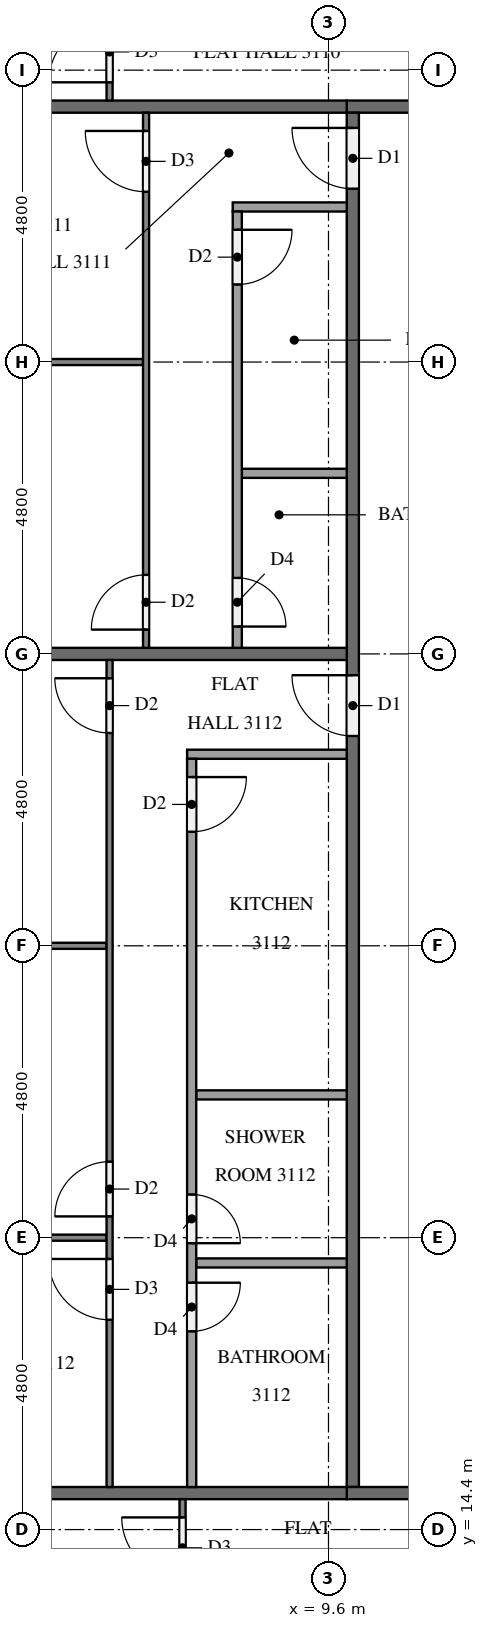
"""IFC4 building model, lengths in metres.
Left out: names, types, materials, properties, quantities, classifications, styles, units other than length and angle.
Written with IfcOpenShell. Run it as: python <this file> out.ifc"""

import sys

from ifc_helpers import new_model, si_unit, direction, frame, frame_2d, origin, place, context, subcontext, project, spatial, rectangle, extrude, element, fill, save


model = new_model("IFC4")
c1 = context("Model", 3, precision=1e-05, world=origin(), true_north=direction((0.0, 1.0)))
c2 = subcontext(c1, "Body", "Model", "MODEL_VIEW")
j1 = project(units=[si_unit("LENGTHUNIT", "METRE"), si_unit("PLANEANGLEUNIT", "RADIAN")], contexts=[c1])
p1 = place(None, origin())
s1 = spatial("IfcSite", under=j1, at=p1, CompositionType="ELEMENT")
p2 = place(p1, origin())
s2 = spatial("IfcBuilding", under=s1, at=p2, CompositionType="ELEMENT")
p3 = place(p2, frame((0.0, 0.0, 122.6)))
s3 = spatial("IfcBuildingStorey", under=s2, at=p3, CompositionType="ELEMENT", Elevation=122.6)
p4 = place(p3, frame((12.1, 37.8, 0.0), z_axis=(0.0, 0.0, 1.0), x_axis=(-1.0, 0.0, 0.0)))
e1 = element("IfcWall", 1, at=p4, inside=s3, PredefinedType="PARTITIONING", context=c2, shape_type="SweptSolid", body=[
    extrude(rectangle(XDim=2.2, YDim=0.2, at=frame_2d((1.1, 0.0))), origin(), (0.0, 0.0, 1.0), 3.2),
])
p5 = place(p3, frame((10.0, 15.1, 0.0), z_axis=(0.0, 0.0, 1.0), x_axis=(0.0, 1.0, 0.0)))
e2 = element("IfcWall", 2, at=p5, inside=s3, PredefinedType="PARTITIONING", context=c2, shape_type="SweptSolid", body=[
    extrude(rectangle(XDim=22.6, YDim=0.2, at=frame_2d((11.3, 0.0))), origin(), (0.0, 0.0, 1.0), 3.2),
])
p6 = place(p5, frame((21.35, 0.0, 0.0)))
e3 = element("IfcOpeningElement", 3, at=p6, cuts=e2, PredefinedType="OPENING", context=c2, shape_type="SweptSolid", body=[
    extrude(rectangle(XDim=1.0, YDim=2.1, at=frame_2d((0.5, 1.05))), frame((0.0, 0.11, 0.0), z_axis=(0.0, -1.0, 0.0), x_axis=(1.0, 0.0, 0.0)), (0.0, 0.0, 1.0), 0.22),
])
p7 = place(p5, frame((12.35, 0.0, 0.0)))
e4 = element("IfcOpeningElement", 4, at=p7, cuts=e2, PredefinedType="OPENING", context=c2, shape_type="SweptSolid", body=[
    extrude(rectangle(XDim=1.0, YDim=2.1, at=frame_2d((0.5, 1.05))), frame((0.0, 0.11, 0.0), z_axis=(0.0, -1.0, 0.0), x_axis=(1.0, 0.0, 0.0)), (0.0, 0.0, 1.0), 0.22),
])
p8 = place(p3, frame((9.9, 15.0, 0.0), z_axis=(0.0, 0.0, 1.0), x_axis=(1.0, 0.0, 0.0)))
e5 = element("IfcWall", 5, at=p8, inside=s3, PredefinedType="PARTITIONING", context=c2, shape_type="SweptSolid", body=[
    extrude(rectangle(XDim=2.2, YDim=0.2, at=frame_2d((1.1, 0.0))), origin(), (0.0, 0.0, 1.0), 3.2),
])
for number, where, z_axis, x_axis in (
    (6, (0.375, 37.8, 0.0), (0.0, 0.0, 1.0), (1.0, 0.0, 0.0)),
    (7, (0.375, 28.8, 0.0), (0.0, 0.0, 1.0), (1.0, 0.0, 0.0)),
):
    element("IfcWall", number, at=place(p3, frame(where, z_axis=z_axis, x_axis=x_axis)), inside=s3, PredefinedType="PARTITIONING", context=c2, shape_type="SweptSolid", body=[
        extrude(rectangle(XDim=9.525, YDim=0.2, at=frame_2d((4.762, 0.0))), origin(), (0.0, 0.0, 1.0), 3.2),
    ])
p9 = place(p3, frame((0.1, 15.0, 0.0), z_axis=(0.0, 0.0, 1.0), x_axis=(1.0, 0.0, 0.0)))
e8 = element("IfcWall", 8, at=p9, inside=s3, PredefinedType="PARTITIONING", context=c2, shape_type="SweptSolid", body=[
    extrude(rectangle(XDim=9.8, YDim=0.2, at=frame_2d((4.9, 0.0))), origin(), (0.0, 0.0, 1.0), 3.2),
])
p10 = place(p3, frame((6.0, 37.9, 0.0), z_axis=(0.0, 0.0, 1.0), x_axis=(0.0, 1.0, 0.0)))
e9 = element("IfcWall", 9, at=p10, inside=s3, PredefinedType="PARTITIONING", context=c2, shape_type="SweptSolid", body=[
    extrude(rectangle(XDim=14.8, YDim=0.1, at=frame_2d((7.4, 0.0))), origin(), (0.0, 0.0, 1.0), 3.2),
])
p11 = place(p10, frame((0.3, 0.0, 0.0)))
e10 = element("IfcOpeningElement", 10, at=p11, cuts=e9, PredefinedType="OPENING", context=c2, shape_type="SweptSolid", body=[
    extrude(rectangle(XDim=1.0, YDim=2.1, at=frame_2d((0.5, 1.05))), frame((0.0, 0.06, 0.0), z_axis=(0.0, -1.0, 0.0), x_axis=(1.0, 0.0, 0.0)), (0.0, 0.0, 1.0), 0.12),
])
p12 = place(p10, frame((8.85, 0.0, 0.0)))
e11 = element("IfcOpeningElement", 11, at=p12, cuts=e9, PredefinedType="OPENING", context=c2, shape_type="SweptSolid", body=[
    extrude(rectangle(XDim=0.9, YDim=2.1, at=frame_2d((0.45, 1.05))), frame((0.0, 0.06, 0.0), z_axis=(0.0, -1.0, 0.0), x_axis=(1.0, 0.0, 0.0)), (0.0, 0.0, 1.0), 0.12),
])
p13 = place(p10, frame((10.45, 0.0, 0.0)))
e12 = element("IfcOpeningElement", 12, at=p13, cuts=e9, PredefinedType="OPENING", context=c2, shape_type="SweptSolid", body=[
    extrude(rectangle(XDim=0.9, YDim=2.1, at=frame_2d((0.45, 1.05))), frame((0.0, 0.06, 0.0), z_axis=(0.0, -1.0, 0.0), x_axis=(1.0, 0.0, 0.0)), (0.0, 0.0, 1.0), 0.12),
])
p14 = place(p3, frame((6.55, 33.6, 0.0), z_axis=(0.0, 0.0, 1.0), x_axis=(-1.0, 0.0, 0.0)))
e13 = element("IfcWall", 13, at=p14, inside=s3, PredefinedType="PARTITIONING", context=c2, shape_type="SweptSolid", body=[
    extrude(rectangle(XDim=6.45, YDim=0.1, at=frame_2d((3.225, 0.0))), origin(), (0.0, 0.0, 1.0), 3.2),
])
p15 = place(p3, frame((6.6, 28.9, 0.0), z_axis=(0.0, 0.0, 1.0), x_axis=(0.0, 1.0, 0.0)))
e14 = element("IfcWall", 14, at=p15, inside=s3, PredefinedType="PARTITIONING", context=c2, shape_type="SweptSolid", body=[
    extrude(rectangle(XDim=8.8, YDim=0.1, at=frame_2d((4.4, 0.0))), origin(), (0.0, 0.0, 1.0), 3.2),
])
p16 = place(p15, frame((7.5, 0.0, 0.0)))
e15 = element("IfcOpeningElement", 15, at=p16, cuts=e14, PredefinedType="OPENING", context=c2, shape_type="SweptSolid", body=[
    extrude(rectangle(XDim=1.0, YDim=2.1, at=frame_2d((0.5, 1.05))), frame((0.0, 0.06, 0.0), z_axis=(0.0, -1.0, 0.0), x_axis=(1.0, 0.0, 0.0)), (0.0, 0.0, 1.0), 0.12),
])
p17 = place(p15, frame((0.3, 0.0, 0.0)))
e16 = element("IfcOpeningElement", 16, at=p17, cuts=e14, PredefinedType="OPENING", context=c2, shape_type="SweptSolid", body=[
    extrude(rectangle(XDim=0.9, YDim=2.1, at=frame_2d((0.45, 1.05))), frame((0.0, 0.06, 0.0), z_axis=(0.0, -1.0, 0.0), x_axis=(1.0, 0.0, 0.0)), (0.0, 0.0, 1.0), 0.12),
])
p18 = place(p3, frame((9.9, 31.77, 0.0), z_axis=(0.0, 0.0, 1.0), x_axis=(-1.0, 0.0, 0.0)))
e17 = element("IfcWall", 17, at=p18, inside=s3, PredefinedType="PARTITIONING", context=c2, shape_type="SweptSolid", body=[
    extrude(rectangle(XDim=1.725, YDim=0.15, at=frame_2d((0.862, 0.0))), origin(), (0.0, 0.0, 1.0), 3.2),
])
p19 = place(p3, frame((9.9, 36.15, 0.0), z_axis=(0.0, 0.0, 1.0), x_axis=(-1.0, 0.0, 0.0)))
e18 = element("IfcWall", 18, at=p19, inside=s3, PredefinedType="PARTITIONING", context=c2, shape_type="SweptSolid", body=[
    extrude(rectangle(XDim=1.875, YDim=0.15, at=frame_2d((0.938, 0.0))), origin(), (0.0, 0.0, 1.0), 3.2),
])
p20 = place(p3, frame((8.1, 36.075, 0.0), z_axis=(0.0, 0.0, 1.0), x_axis=(0.0, -1.0, 0.0)))
e19 = element("IfcWall", 19, at=p20, inside=s3, PredefinedType="PARTITIONING", context=c2, shape_type="SweptSolid", body=[
    extrude(rectangle(XDim=7.175, YDim=0.15, at=frame_2d((3.587, 0.0))), origin(), (0.0, 0.0, 1.0), 3.2),
])
p21 = place(p20, frame((0.3, 0.0, 0.0)))
e20 = element("IfcOpeningElement", 20, at=p21, cuts=e19, PredefinedType="OPENING", context=c2, shape_type="SweptSolid", body=[
    extrude(rectangle(XDim=0.9, YDim=2.1, at=frame_2d((0.45, 1.05))), frame((0.0, 0.085, 0.0), z_axis=(0.0, -1.0, 0.0), x_axis=(1.0, 0.0, 0.0)), (0.0, 0.0, 1.0), 0.17),
])
p22 = place(p20, frame((6.025, 0.0, 0.0)))
e21 = element("IfcOpeningElement", 21, at=p22, cuts=e19, PredefinedType="OPENING", context=c2, shape_type="SweptSolid", body=[
    extrude(rectangle(XDim=0.8, YDim=2.1, at=frame_2d((0.4, 1.05))), frame((0.0, 0.085, 0.0), z_axis=(0.0, -1.0, 0.0), x_axis=(1.0, 0.0, 0.0)), (0.0, 0.0, 1.0), 0.17),
])
p23 = place(p3, frame((5.95, 24.0, 0.0), z_axis=(0.0, 0.0, 1.0), x_axis=(-1.0, 0.0, 0.0)))
e22 = element("IfcWall", 22, at=p23, inside=s3, PredefinedType="PARTITIONING", context=c2, shape_type="SweptSolid", body=[
    extrude(rectangle(XDim=5.85, YDim=0.1, at=frame_2d((2.925, 0.0))), origin(), (0.0, 0.0, 1.0), 3.2),
])
p24 = place(p3, frame((5.95, 19.2, 0.0), z_axis=(0.0, 0.0, 1.0), x_axis=(-1.0, 0.0, 0.0)))
e23 = element("IfcWall", 23, at=p24, inside=s3, PredefinedType="PARTITIONING", context=c2, shape_type="SweptSolid", body=[
    extrude(rectangle(XDim=5.575, YDim=0.1, at=frame_2d((2.788, 0.0))), origin(), (0.0, 0.0, 1.0), 3.2),
])
p25 = place(p3, frame((6.0, 15.1, 0.0), z_axis=(0.0, 0.0, 1.0), x_axis=(0.0, 1.0, 0.0)))
e24 = element("IfcWall", 24, at=p25, inside=s3, PredefinedType="PARTITIONING", context=c2, shape_type="SweptSolid", body=[
    extrude(rectangle(XDim=13.6, YDim=0.1, at=frame_2d((6.8, 0.0))), origin(), (0.0, 0.0, 1.0), 3.2),
])
p26 = place(p25, frame((12.4, 0.0, 0.0)))
e25 = element("IfcOpeningElement", 25, at=p26, cuts=e24, PredefinedType="OPENING", context=c2, shape_type="SweptSolid", body=[
    extrude(rectangle(XDim=0.9, YDim=2.1, at=frame_2d((0.45, 1.05))), frame((0.0, 0.06, 0.0), z_axis=(0.0, -1.0, 0.0), x_axis=(1.0, 0.0, 0.0)), (0.0, 0.0, 1.0), 0.12),
])
p27 = place(p25, frame((4.45, 0.0, 0.0)))
e26 = element("IfcOpeningElement", 26, at=p27, cuts=e24, PredefinedType="OPENING", context=c2, shape_type="SweptSolid", body=[
    extrude(rectangle(XDim=0.9, YDim=2.1, at=frame_2d((0.45, 1.05))), frame((0.0, 0.06, 0.0), z_axis=(0.0, -1.0, 0.0), x_axis=(1.0, 0.0, 0.0)), (0.0, 0.0, 1.0), 0.12),
])
p28 = place(p25, frame((2.75, 0.0, 0.0)))
e27 = element("IfcOpeningElement", 27, at=p28, cuts=e24, PredefinedType="OPENING", context=c2, shape_type="SweptSolid", body=[
    extrude(rectangle(XDim=1.0, YDim=2.1, at=frame_2d((0.5, 1.05))), frame((0.0, 0.06, 0.0), z_axis=(0.0, -1.0, 0.0), x_axis=(1.0, 0.0, 0.0)), (0.0, 0.0, 1.0), 0.12),
])
for number, where, z_axis, x_axis in (
    (28, (9.9, 21.548, 0.0), (0.0, 0.0, 1.0), (-1.0, 0.0, 0.0)),
    (29, (9.9, 18.785, 0.0), (0.0, 0.0, 1.0), (-1.0, 0.0, 0.0)),
):
    element("IfcWall", number, at=place(p3, frame(where, z_axis=z_axis, x_axis=x_axis)), inside=s3, PredefinedType="PARTITIONING", context=c2, shape_type="SweptSolid", body=[
        extrude(rectangle(XDim=2.475, YDim=0.15, at=frame_2d((1.237, 0.0))), origin(), (0.0, 0.0, 1.0), 3.2),
    ])
p29 = place(p3, frame((9.9, 27.15, 0.0), z_axis=(0.0, 0.0, 1.0), x_axis=(-1.0, 0.0, 0.0)))
e30 = element("IfcWall", 30, at=p29, inside=s3, PredefinedType="PARTITIONING", context=c2, shape_type="SweptSolid", body=[
    extrude(rectangle(XDim=2.625, YDim=0.15, at=frame_2d((1.312, 0.0))), origin(), (0.0, 0.0, 1.0), 3.2),
])
p30 = place(p3, frame((7.35, 27.075, 0.0), z_axis=(0.0, 0.0, 1.0), x_axis=(0.0, -1.0, 0.0)))
e31 = element("IfcWall", 31, at=p30, inside=s3, PredefinedType="PARTITIONING", context=c2, shape_type="SweptSolid", body=[
    extrude(rectangle(XDim=11.975, YDim=0.15, at=frame_2d((5.987, 0.0))), origin(), (0.0, 0.0, 1.0), 3.2),
])
p31 = place(p30, frame((0.3, 0.0, 0.0)))
e32 = element("IfcOpeningElement", 32, at=p31, cuts=e31, PredefinedType="OPENING", context=c2, shape_type="SweptSolid", body=[
    extrude(rectangle(XDim=0.9, YDim=2.1, at=frame_2d((0.45, 1.05))), frame((0.0, 0.085, 0.0), z_axis=(0.0, -1.0, 0.0), x_axis=(1.0, 0.0, 0.0)), (0.0, 0.0, 1.0), 0.17),
])
p32 = place(p30, frame((7.165, 0.0, 0.0)))
e33 = element("IfcOpeningElement", 33, at=p32, cuts=e31, PredefinedType="OPENING", context=c2, shape_type="SweptSolid", body=[
    extrude(rectangle(XDim=0.8, YDim=2.1, at=frame_2d((0.4, 1.05))), frame((0.0, 0.085, 0.0), z_axis=(0.0, -1.0, 0.0), x_axis=(1.0, 0.0, 0.0)), (0.0, 0.0, 1.0), 0.17),
])
p33 = place(p30, frame((8.615, 0.0, 0.0)))
e34 = element("IfcOpeningElement", 34, at=p33, cuts=e31, PredefinedType="OPENING", context=c2, shape_type="SweptSolid", body=[
    extrude(rectangle(XDim=0.8, YDim=2.1, at=frame_2d((0.4, 1.05))), frame((0.0, 0.085, 0.0), z_axis=(0.0, -1.0, 0.0), x_axis=(1.0, 0.0, 0.0)), (0.0, 0.0, 1.0), 0.17),
])
p34 = place(p3, frame((7.2, 4.9, 0.0), z_axis=(0.0, 0.0, 1.0), x_axis=(0.0, 1.0, 0.0)))
e35 = element("IfcWall", 35, at=p34, inside=s3, PredefinedType="PARTITIONING", context=c2, shape_type="SweptSolid", body=[
    extrude(rectangle(XDim=10.0, YDim=0.1, at=frame_2d((5.0, 0.0))), origin(), (0.0, 0.0, 1.0), 3.2),
])
p35 = place(p34, frame((8.7, 0.0, 0.0)))
e36 = element("IfcOpeningElement", 36, at=p35, cuts=e35, PredefinedType="OPENING", context=c2, shape_type="SweptSolid", body=[
    extrude(rectangle(XDim=1.0, YDim=2.1, at=frame_2d((0.5, 1.05))), frame((0.0, 0.06, 0.0), z_axis=(0.0, -1.0, 0.0), x_axis=(1.0, 0.0, 0.0)), (0.0, 0.0, 1.0), 0.12),
])
p36 = place(p34, frame((0.3, 0.0, 0.0)))
e37 = element("IfcOpeningElement", 37, at=p36, cuts=e35, PredefinedType="OPENING", context=c2, shape_type="SweptSolid", body=[
    extrude(rectangle(XDim=0.9, YDim=2.1, at=frame_2d((0.45, 1.05))), frame((0.0, 0.06, 0.0), z_axis=(0.0, -1.0, 0.0), x_axis=(1.0, 0.0, 0.0)), (0.0, 0.0, 1.0), 0.12),
])
p37 = place(p6, origin())
e38 = element("IfcDoor", 38, at=p37, inside=s3, OperationType="SINGLE_SWING_RIGHT", PredefinedType="DOOR", context=c2, shape_type="SweptSolid", body=[
    extrude(rectangle(XDim=1.0, YDim=2.1, at=frame_2d((0.5, 1.05))), frame((0.0, 0.025, 0.0), z_axis=(0.0, -1.0, 0.0), x_axis=(1.0, 0.0, 0.0)), (0.0, 0.0, 1.0), 0.05),
])
fill(e3, e38)
p38 = place(p7, origin())
e39 = element("IfcDoor", 39, at=p38, inside=s3, OperationType="SINGLE_SWING_RIGHT", PredefinedType="DOOR", context=c2, shape_type="SweptSolid", body=[
    extrude(rectangle(XDim=1.0, YDim=2.1, at=frame_2d((0.5, 1.05))), frame((0.0, 0.025, 0.0), z_axis=(0.0, -1.0, 0.0), x_axis=(1.0, 0.0, 0.0)), (0.0, 0.0, 1.0), 0.05),
])
fill(e4, e39)
p39 = place(p11, origin())
e40 = element("IfcDoor", 40, at=p39, inside=s3, OperationType="SINGLE_SWING_LEFT", PredefinedType="DOOR", context=c2, shape_type="SweptSolid", body=[
    extrude(rectangle(XDim=1.0, YDim=2.1, at=frame_2d((0.5, 1.05))), frame((0.0, 0.025, 0.0), z_axis=(0.0, -1.0, 0.0), x_axis=(1.0, 0.0, 0.0)), (0.0, 0.0, 1.0), 0.05),
])
fill(e10, e40)
p40 = place(p16, origin())
e41 = element("IfcDoor", 41, at=p40, inside=s3, OperationType="SINGLE_SWING_RIGHT", PredefinedType="DOOR", context=c2, shape_type="SweptSolid", body=[
    extrude(rectangle(XDim=1.0, YDim=2.1, at=frame_2d((0.5, 1.05))), frame((0.0, 0.025, 0.0), z_axis=(0.0, -1.0, 0.0), x_axis=(1.0, 0.0, 0.0)), (0.0, 0.0, 1.0), 0.05),
])
fill(e15, e41)
p41 = place(p17, origin())
e42 = element("IfcDoor", 42, at=p41, inside=s3, OperationType="SINGLE_SWING_LEFT", PredefinedType="DOOR", context=c2, shape_type="SweptSolid", body=[
    extrude(rectangle(XDim=0.9, YDim=2.1, at=frame_2d((0.45, 1.05))), frame((0.0, 0.025, 0.0), z_axis=(0.0, -1.0, 0.0), x_axis=(1.0, 0.0, 0.0)), (0.0, 0.0, 1.0), 0.05),
])
fill(e16, e42)
p42 = place(p21, origin())
e43 = element("IfcDoor", 43, at=p42, inside=s3, OperationType="SINGLE_SWING_LEFT", PredefinedType="DOOR", context=c2, shape_type="SweptSolid", body=[
    extrude(rectangle(XDim=0.9, YDim=2.1, at=frame_2d((0.45, 1.05))), frame((0.0, 0.025, 0.0), z_axis=(0.0, -1.0, 0.0), x_axis=(1.0, 0.0, 0.0)), (0.0, 0.0, 1.0), 0.05),
])
fill(e20, e43)
p43 = place(p22, origin())
e44 = element("IfcDoor", 44, at=p43, inside=s3, OperationType="SINGLE_SWING_RIGHT", PredefinedType="DOOR", context=c2, shape_type="SweptSolid", body=[
    extrude(rectangle(XDim=0.8, YDim=2.1, at=frame_2d((0.4, 1.05))), frame((0.0, 0.025, 0.0), z_axis=(0.0, -1.0, 0.0), x_axis=(1.0, 0.0, 0.0)), (0.0, 0.0, 1.0), 0.05),
])
fill(e21, e44)
p44 = place(p26, origin())
e45 = element("IfcDoor", 45, at=p44, inside=s3, OperationType="SINGLE_SWING_RIGHT", PredefinedType="DOOR", context=c2, shape_type="SweptSolid", body=[
    extrude(rectangle(XDim=0.9, YDim=2.1, at=frame_2d((0.45, 1.05))), frame((0.0, 0.025, 0.0), z_axis=(0.0, -1.0, 0.0), x_axis=(1.0, 0.0, 0.0)), (0.0, 0.0, 1.0), 0.05),
])
fill(e25, e45)
p45 = place(p27, origin())
e46 = element("IfcDoor", 46, at=p45, inside=s3, OperationType="SINGLE_SWING_LEFT", PredefinedType="DOOR", context=c2, shape_type="SweptSolid", body=[
    extrude(rectangle(XDim=0.9, YDim=2.1, at=frame_2d((0.45, 1.05))), frame((0.0, 0.025, 0.0), z_axis=(0.0, -1.0, 0.0), x_axis=(1.0, 0.0, 0.0)), (0.0, 0.0, 1.0), 0.05),
])
fill(e26, e46)
p46 = place(p28, origin())
e47 = element("IfcDoor", 47, at=p46, inside=s3, OperationType="SINGLE_SWING_RIGHT", PredefinedType="DOOR", context=c2, shape_type="SweptSolid", body=[
    extrude(rectangle(XDim=1.0, YDim=2.1, at=frame_2d((0.5, 1.05))), frame((0.0, 0.025, 0.0), z_axis=(0.0, -1.0, 0.0), x_axis=(1.0, 0.0, 0.0)), (0.0, 0.0, 1.0), 0.05),
])
fill(e27, e47)
p47 = place(p31, origin())
e48 = element("IfcDoor", 48, at=p47, inside=s3, OperationType="SINGLE_SWING_LEFT", PredefinedType="DOOR", context=c2, shape_type="SweptSolid", body=[
    extrude(rectangle(XDim=0.9, YDim=2.1, at=frame_2d((0.45, 1.05))), frame((0.0, 0.025, 0.0), z_axis=(0.0, -1.0, 0.0), x_axis=(1.0, 0.0, 0.0)), (0.0, 0.0, 1.0), 0.05),
])
fill(e32, e48)
p48 = place(p32, origin())
e49 = element("IfcDoor", 49, at=p48, inside=s3, OperationType="SINGLE_SWING_RIGHT", PredefinedType="DOOR", context=c2, shape_type="SweptSolid", body=[
    extrude(rectangle(XDim=0.8, YDim=2.1, at=frame_2d((0.4, 1.05))), frame((0.0, 0.025, 0.0), z_axis=(0.0, -1.0, 0.0), x_axis=(1.0, 0.0, 0.0)), (0.0, 0.0, 1.0), 0.05),
])
fill(e33, e49)
p49 = place(p33, origin())
e50 = element("IfcDoor", 50, at=p49, inside=s3, OperationType="SINGLE_SWING_LEFT", PredefinedType="DOOR", context=c2, shape_type="SweptSolid", body=[
    extrude(rectangle(XDim=0.8, YDim=2.1, at=frame_2d((0.4, 1.05))), frame((0.0, 0.025, 0.0), z_axis=(0.0, -1.0, 0.0), x_axis=(1.0, 0.0, 0.0)), (0.0, 0.0, 1.0), 0.05),
])
fill(e34, e50)
p50 = place(p35, origin())
e51 = element("IfcDoor", 51, at=p50, inside=s3, OperationType="SINGLE_SWING_RIGHT", PredefinedType="DOOR", context=c2, shape_type="SweptSolid", body=[
    extrude(rectangle(XDim=1.0, YDim=2.1, at=frame_2d((0.5, 1.05))), frame((0.0, 0.025, 0.0), z_axis=(0.0, -1.0, 0.0), x_axis=(1.0, 0.0, 0.0)), (0.0, 0.0, 1.0), 0.05),
])
fill(e36, e51)
save(model, sys.argv[1])
